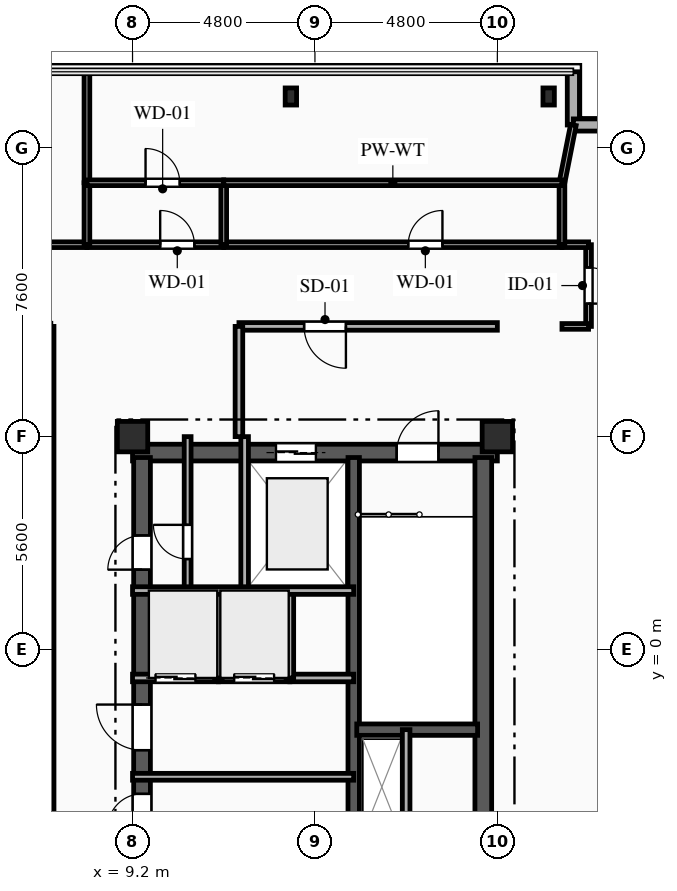
"""IFC4 building model, lengths in metres.
Left out: names, types, materials, properties, quantities, classifications, styles, units other than length and angle.
Written with IfcOpenShell. Run it as: python <this file> out.ifc"""

import sys

from ifc_helpers import new_model, si_unit, direction, frame, frame_2d, origin, origin_2d, place, context, subcontext, project, spatial, rectangle, i_section, extrude, element, fill, save


model = new_model("IFC4")
c1 = context("Model", 3, precision=1e-05, world=origin(), true_north=direction((0.0, 1.0)))
c2 = subcontext(c1, "Body", "Model", "MODEL_VIEW")
j1 = project(units=[si_unit("LENGTHUNIT", "METRE"), si_unit("PLANEANGLEUNIT", "RADIAN")], contexts=[c1])
p1 = place(None, origin())
s1 = spatial("IfcSite", under=j1, at=p1, CompositionType="ELEMENT")
p2 = place(p1, origin())
s2 = spatial("IfcBuilding", under=s1, at=p2, CompositionType="ELEMENT")
p3 = place(p2, frame((0.0, 0.0, 266.0)))
s3 = spatial("IfcBuildingStorey", under=s2, at=p3, CompositionType="ELEMENT", Elevation=266.0)
for number, where, z_axis, x_axis in (
    (1, (9.2, 5.6, 0.0), (0.0, 0.0, 1.0), (1.0, 0.0, 0.0)),
    (2, (18.8, 5.6, 0.0), (0.0, 0.0, 1.0), (1.0, 0.0, 0.0)),
):
    element("IfcColumn", number, at=place(p3, frame(where, z_axis=z_axis, x_axis=x_axis)), inside=s3, PredefinedType="COLUMN", context=c2, shape_type="SweptSolid", body=[
        extrude(rectangle(XDim=0.8, YDim=0.8, at=origin_2d()), origin(), (0.0, 0.0, 1.0), 4.2),
    ])
for number, where, z_axis, x_axis in (
    (3, (20.15, 14.55, 0.0), (0.0, 0.0, 1.0), (1.0, 0.0, 0.0)),
    (4, (13.367, 14.55, 0.0), (0.0, 0.0, 1.0), (1.0, 0.0, 0.0)),
):
    element("IfcColumn", number, at=place(p3, frame(where, z_axis=z_axis, x_axis=x_axis)), inside=s3, PredefinedType="COLUMN", context=c2, shape_type="SweptSolid", body=[
        extrude(i_section(OverallWidth=0.3, OverallDepth=0.45, WebThickness=0.014, FlangeThickness=0.026, FilletRadius=0.027, at=origin_2d()), origin(), (0.0, 0.0, 1.0), 4.2),
    ])
for number, where, z_axis, x_axis in (
    (5, (20.8, 15.2, 0.0), (0.0, 0.0, 1.0), (0.0, -1.0, 0.0)),
    (6, (20.8, 13.8, 0.0), (0.0, 0.0, 1.0), (1.0, 0.0, 0.0)),
):
    element("IfcWall", number, at=place(p3, frame(where, z_axis=z_axis, x_axis=x_axis)), inside=s3, PredefinedType="SOLIDWALL", context=c2, shape_type="SweptSolid", body=[
        extrude(rectangle(XDim=1.4, YDim=0.32, at=frame_2d((0.7, 0.0))), origin(), (0.0, 0.0, 1.0), 3.8),
    ])
p4 = place(p3, frame((9.2, 5.18, 0.0), z_axis=(0.0, 0.0, 1.0), x_axis=(1.0, 0.0, 0.0)))
e7 = element("IfcWall", 7, at=p4, inside=s3, PredefinedType="SHEAR", context=c2, shape_type="SweptSolid", body=[
    extrude(rectangle(XDim=9.6, YDim=0.44, at=frame_2d((4.8, 0.0))), origin(), (0.0, 0.0, 1.0), 3.8),
])
p5 = place(p4, frame((6.95, 0.0, 0.0)))
e8 = element("IfcOpeningElement", 8, at=p5, cuts=e7, PredefinedType="OPENING", context=c2, shape_type="SweptSolid", body=[
    extrude(rectangle(XDim=1.1, YDim=2.15, at=frame_2d((0.55, 1.075))), frame((0.0, 0.23, 0.0), z_axis=(0.0, -1.0, 0.0), x_axis=(1.0, 0.0, 0.0)), (0.0, 0.0, 1.0), 0.46),
])
p6 = place(p4, frame((3.775, 0.0, 0.0)))
e9 = element("IfcOpeningElement", 9, at=p6, cuts=e7, PredefinedType="OPENING", context=c2, shape_type="SweptSolid", body=[
    extrude(rectangle(XDim=1.05, YDim=2.1, at=frame_2d((0.525, 1.05))), frame((0.0, 0.23, 0.0), z_axis=(0.0, -1.0, 0.0), x_axis=(1.0, 0.0, 0.0)), (0.0, 0.0, 1.0), 0.46),
])
p7 = place(p3, frame((9.45, -5.05, 0.0), z_axis=(0.0, 0.0, 1.0), x_axis=(0.0, 1.0, 0.0)))
e10 = element("IfcWall", 10, at=p7, inside=s3, PredefinedType="SHEAR", context=c2, shape_type="SweptSolid", body=[
    extrude(rectangle(XDim=10.1, YDim=0.44, at=frame_2d((5.05, 0.0))), origin(), (0.0, 0.0, 1.0), 3.8),
])
p8 = place(p7, frame((7.15, 0.0, 0.0)))
e11 = element("IfcOpeningElement", 11, at=p8, cuts=e10, PredefinedType="OPENING", context=c2, shape_type="SweptSolid", body=[
    extrude(rectangle(XDim=0.9, YDim=2.1, at=frame_2d((0.45, 1.05))), frame((0.0, 0.23, 0.0), z_axis=(0.0, -1.0, 0.0), x_axis=(1.0, 0.0, 0.0)), (0.0, 0.0, 1.0), 0.46),
])
p9 = place(p7, frame((2.4, 0.0, 0.0)))
e12 = element("IfcOpeningElement", 12, at=p9, cuts=e10, PredefinedType="OPENING", context=c2, shape_type="SweptSolid", body=[
    extrude(rectangle(XDim=1.2, YDim=2.15, at=frame_2d((0.6, 1.075))), frame((0.0, 0.23, 0.0), z_axis=(0.0, -1.0, 0.0), x_axis=(1.0, 0.0, 0.0)), (0.0, 0.0, 1.0), 0.46),
])
p10 = place(p7, frame((0.35, 0.0, 0.0)))
e13 = element("IfcOpeningElement", 13, at=p10, cuts=e10, PredefinedType="OPENING", context=c2, shape_type="SweptSolid", body=[
    extrude(rectangle(XDim=0.9, YDim=2.1, at=frame_2d((0.45, 1.05))), frame((0.0, 0.23, 0.0), z_axis=(0.0, -1.0, 0.0), x_axis=(1.0, 0.0, 0.0)), (0.0, 0.0, 1.0), 0.46),
])
p11 = place(p3, frame((18.43, -5.05, 0.0), z_axis=(0.0, 0.0, 1.0), x_axis=(0.0, 1.0, 0.0)))
e14 = element("IfcWall", 14, at=p11, inside=s3, PredefinedType="SHEAR", context=c2, shape_type="SweptSolid", body=[
    extrude(rectangle(XDim=10.1, YDim=0.44, at=frame_2d((5.05, 0.0))), origin(), (0.0, 0.0, 1.0), 3.8),
])
p12 = place(p3, frame((15.02, -5.05, 0.0), z_axis=(0.0, 0.0, 1.0), x_axis=(0.0, 1.0, 0.0)))
e15 = element("IfcWall", 15, at=p12, inside=s3, PredefinedType="SHEAR", context=c2, shape_type="SweptSolid", body=[
    extrude(rectangle(XDim=10.1, YDim=0.3, at=frame_2d((5.05, 0.0))), origin(), (0.0, 0.0, 1.0), 3.8),
])
p13 = place(p3, frame((15.1, -2.11, 0.0), z_axis=(0.0, 0.0, 1.0), x_axis=(1.0, 0.0, 0.0)))
e16 = element("IfcWall", 16, at=p13, inside=s3, PredefinedType="SHEAR", context=c2, shape_type="SweptSolid", body=[
    extrude(rectangle(XDim=3.18, YDim=0.3, at=frame_2d((1.59, 0.0))), origin(), (0.0, 0.0, 1.0), 3.8),
])
p14 = place(p3, frame((16.4, -2.11, 0.0), z_axis=(0.0, 0.0, 1.0), x_axis=(0.0, -1.0, 0.0)))
e17 = element("IfcWall", 17, at=p14, inside=s3, PredefinedType="PARTITIONING", context=c2, shape_type="SweptSolid", body=[
    extrude(rectangle(XDim=3.49, YDim=0.2, at=frame_2d((1.745, 0.0))), origin(), (0.0, 0.0, 1.0), 3.8),
])
p15 = place(p3, frame((12.15, 5.6, 0.0), z_axis=(0.0, 0.0, 1.0), x_axis=(0.0, -1.0, 0.0)))
e18 = element("IfcWall", 18, at=p15, inside=s3, PredefinedType="PARTITIONING", context=c2, shape_type="SweptSolid", body=[
    extrude(rectangle(XDim=4.05, YDim=0.2, at=frame_2d((2.025, 0.0))), origin(), (0.0, 0.0, 1.0), 3.8),
])
p16 = place(p3, frame((18.8, 8.5, 0.0), z_axis=(0.0, 0.0, 1.0), x_axis=(-1.0, 0.0, 0.0)))
e19 = element("IfcWall", 19, at=p16, inside=s3, PredefinedType="PARTITIONING", context=c2, shape_type="SweptSolid", body=[
    extrude(rectangle(XDim=6.8, YDim=0.2, at=frame_2d((3.4, 0.0))), origin(), (0.0, 0.0, 1.0), 3.8),
])
p17 = place(p16, frame((3.985, 0.0, 0.0)))
e20 = element("IfcOpeningElement", 20, at=p17, cuts=e19, PredefinedType="OPENING", context=c2, shape_type="SweptSolid", body=[
    extrude(rectangle(XDim=1.1, YDim=2.15, at=frame_2d((0.55, 1.075))), frame((0.0, 0.11, 0.0), z_axis=(0.0, -1.0, 0.0), x_axis=(1.0, 0.0, 0.0)), (0.0, 0.0, 1.0), 0.22),
])
p18 = place(p3, frame((12.0, 8.5, 0.0), z_axis=(0.0, 0.0, 1.0), x_axis=(0.0, -1.0, 0.0)))
e21 = element("IfcWall", 21, at=p18, inside=s3, PredefinedType="PARTITIONING", context=c2, shape_type="SweptSolid", body=[
    extrude(rectangle(XDim=2.9, YDim=0.2, at=frame_2d((1.45, 0.0))), origin(), (0.0, 0.0, 1.0), 3.8),
])
p19 = place(p3, frame((10.65, 1.55, 0.0), z_axis=(0.0, 0.0, 1.0), x_axis=(0.0, 1.0, 0.0)))
e22 = element("IfcWall", 22, at=p19, inside=s3, PredefinedType="PARTITIONING", context=c2, shape_type="SweptSolid", body=[
    extrude(rectangle(XDim=4.05, YDim=0.18, at=frame_2d((2.025, 0.0))), origin(), (0.0, 0.0, 1.0), 3.8),
])
p20 = place(p19, frame((0.829, 0.0, 0.0)))
e23 = element("IfcOpeningElement", 23, at=p20, cuts=e22, PredefinedType="OPENING", context=c2, shape_type="SweptSolid", body=[
    extrude(rectangle(XDim=0.9, YDim=2.1, at=frame_2d((0.45, 1.05))), frame((0.0, 0.1, 0.0), z_axis=(0.0, -1.0, 0.0), x_axis=(1.0, 0.0, 0.0)), (0.0, 0.0, 1.0), 0.2),
])
p21 = place(p3, frame((9.2, -3.35, 0.0), z_axis=(0.0, 0.0, 1.0), x_axis=(1.0, 0.0, 0.0)))
e24 = element("IfcWall", 24, at=p21, inside=s3, PredefinedType="PARTITIONING", context=c2, shape_type="SweptSolid", body=[
    extrude(rectangle(XDim=5.82, YDim=0.18, at=frame_2d((2.91, 0.0))), origin(), (0.0, 0.0, 1.0), 3.8),
])
p22 = place(p3, frame((11.46, -0.75, 0.0), z_axis=(0.0, 0.0, 1.0), x_axis=(-1.0, 0.0, 0.0)))
e25 = element("IfcWall", 25, at=p22, inside=s3, PredefinedType="PARTITIONING", context=c2, shape_type="SweptSolid", body=[
    extrude(rectangle(XDim=2.26, YDim=0.2, at=frame_2d((1.13, 0.0))), origin(), (0.0, 0.0, 1.0), 3.8),
])
p23 = place(p22, frame((0.605, 0.0, 0.0)))
e26 = element("IfcOpeningElement", 26, at=p23, cuts=e25, PredefinedType="OPENING", context=c2, shape_type="SweptSolid", body=[
    extrude(rectangle(XDim=1.05, YDim=2.1, at=frame_2d((0.525, 1.05))), frame((0.0, 0.11, 0.0), z_axis=(0.0, -1.0, 0.0), x_axis=(1.0, 0.0, 0.0)), (0.0, 0.0, 1.0), 0.22),
])
p24 = place(p3, frame((13.34, -0.75, 0.0), z_axis=(0.0, 0.0, 1.0), x_axis=(-1.0, 0.0, 0.0)))
e27 = element("IfcWall", 27, at=p24, inside=s3, PredefinedType="PARTITIONING", context=c2, shape_type="SweptSolid", body=[
    extrude(rectangle(XDim=1.88, YDim=0.2, at=frame_2d((0.94, 0.0))), origin(), (0.0, 0.0, 1.0), 3.8),
])
p25 = place(p24, frame((0.415, 0.0, 0.0)))
e28 = element("IfcOpeningElement", 28, at=p25, cuts=e27, PredefinedType="OPENING", context=c2, shape_type="SweptSolid", body=[
    extrude(rectangle(XDim=1.05, YDim=2.1, at=frame_2d((0.525, 1.05))), frame((0.0, 0.11, 0.0), z_axis=(0.0, -1.0, 0.0), x_axis=(1.0, 0.0, 0.0)), (0.0, 0.0, 1.0), 0.22),
])
p26 = place(p3, frame((15.02, -0.75, 0.0), z_axis=(0.0, 0.0, 1.0), x_axis=(-1.0, 0.0, 0.0)))
e29 = element("IfcWall", 29, at=p26, inside=s3, PredefinedType="PARTITIONING", context=c2, shape_type="SweptSolid", body=[
    extrude(rectangle(XDim=1.68, YDim=0.2, at=frame_2d((0.84, 0.0))), origin(), (0.0, 0.0, 1.0), 3.8),
])
for number, where, z_axis, x_axis in (
    (30, (11.46, -0.75, 0.0), (0.0, 0.0, 1.0), (0.0, 1.0, 0.0)),
    (31, (13.34, -0.75, 0.0), (0.0, 0.0, 1.0), (0.0, 1.0, 0.0)),
):
    element("IfcWall", number, at=place(p3, frame(where, z_axis=z_axis, x_axis=x_axis)), inside=s3, PredefinedType="PARTITIONING", context=c2, shape_type="SweptSolid", body=[
        extrude(rectangle(XDim=2.3, YDim=0.2, at=frame_2d((1.15, 0.0))), origin(), (0.0, 0.0, 1.0), 3.8),
    ])
p27 = place(p3, frame((21.2, 10.65, 0.0), z_axis=(0.0, 0.0, 1.0), x_axis=(0.0, -1.0, 0.0)))
e32 = element("IfcWall", 32, at=p27, inside=s3, PredefinedType="PARTITIONING", context=c2, shape_type="SweptSolid", body=[
    extrude(rectangle(XDim=2.15, YDim=0.15, at=frame_2d((1.075, 0.0))), origin(), (0.0, 0.0, 1.0), 3.8),
])
p28 = place(p27, frame((0.6, 0.0, 0.0)))
e33 = element("IfcOpeningElement", 33, at=p28, cuts=e32, PredefinedType="OPENING", context=c2, shape_type="SweptSolid", body=[
    extrude(rectangle(XDim=0.95, YDim=2.1, at=frame_2d((0.475, 1.05))), frame((0.0, 0.085, 0.0), z_axis=(0.0, -1.0, 0.0), x_axis=(1.0, 0.0, 0.0)), (0.0, 0.0, 1.0), 0.17),
])
for number, where, z_axis, x_axis in (
    (34, (20.5, 10.65, 0.0), (0.0, 0.0, 1.0), (1.0, 0.0, 0.0)),
    (35, (21.2, 8.5, 0.0), (0.0, 0.0, 1.0), (-1.0, 0.0, 0.0)),
):
    element("IfcWall", number, at=place(p3, frame(where, z_axis=z_axis, x_axis=x_axis)), inside=s3, PredefinedType="PARTITIONING", context=c2, shape_type="SweptSolid", body=[
        extrude(rectangle(XDim=0.7, YDim=0.15, at=frame_2d((0.35, 0.0))), origin(), (0.0, 0.0, 1.0), 3.8),
    ])
p29 = place(p3, frame((0.0, 10.65, 0.0), z_axis=(0.0, 0.0, 1.0), x_axis=(1.0, 0.0, 0.0)))
e36 = element("IfcWall", 36, at=p29, inside=s3, PredefinedType="PARTITIONING", context=c2, shape_type="SweptSolid", body=[
    extrude(rectangle(XDim=8.0, YDim=0.15, at=frame_2d((4.0, 0.0))), origin(), (0.0, 0.0, 1.0), 3.8),
])
p30 = place(p3, frame((8.0, 10.65, 0.0), z_axis=(0.0, 0.0, 1.0), x_axis=(1.0, 0.0, 0.0)))
e37 = element("IfcWall", 37, at=p30, inside=s3, PredefinedType="PLUMBINGWALL", context=c2, shape_type="SweptSolid", body=[
    extrude(rectangle(XDim=3.6, YDim=0.15, at=frame_2d((1.8, 0.0))), origin(), (0.0, 0.0, 1.0), 3.8),
])
p31 = place(p30, frame((1.927, 0.0, 0.0)))
e38 = element("IfcOpeningElement", 38, at=p31, cuts=e37, PredefinedType="OPENING", context=c2, shape_type="SweptSolid", body=[
    extrude(rectangle(XDim=0.9, YDim=2.1, at=frame_2d((0.45, 1.05))), frame((0.0, 0.085, 0.0), z_axis=(0.0, -1.0, 0.0), x_axis=(1.0, 0.0, 0.0)), (0.0, 0.0, 1.0), 0.17),
])
p32 = place(p3, frame((11.6, 10.65, 0.0), z_axis=(0.0, 0.0, 1.0), x_axis=(1.0, 0.0, 0.0)))
e39 = element("IfcWall", 39, at=p32, inside=s3, PredefinedType="PLUMBINGWALL", context=c2, shape_type="SweptSolid", body=[
    extrude(rectangle(XDim=8.9, YDim=0.15, at=frame_2d((4.45, 0.0))), origin(), (0.0, 0.0, 1.0), 3.8),
])
p33 = place(p32, frame((4.855, 0.0, 0.0)))
e40 = element("IfcOpeningElement", 40, at=p33, cuts=e39, PredefinedType="OPENING", context=c2, shape_type="SweptSolid", body=[
    extrude(rectangle(XDim=0.9, YDim=2.1, at=frame_2d((0.45, 1.05))), frame((0.0, 0.085, 0.0), z_axis=(0.0, -1.0, 0.0), x_axis=(1.0, 0.0, 0.0)), (0.0, 0.0, 1.0), 0.17),
])
p34 = place(p3, frame((7.05, -5.6, 0.0), z_axis=(0.0, 0.0, 1.0), x_axis=(0.0, 1.0, 0.0)))
e41 = element("IfcWall", 41, at=p34, inside=s3, PredefinedType="PARTITIONING", context=c2, shape_type="SweptSolid", body=[
    extrude(rectangle(XDim=14.1, YDim=0.165, at=frame_2d((7.05, 0.0))), origin(), (0.0, 0.0, 1.0), 3.8),
])
p35 = place(p3, frame((20.5, 10.65, 0.0), z_axis=(0.0, 0.0, 1.0), x_axis=(0.0, 1.0, 0.0)))
e42 = element("IfcWall", 42, at=p35, inside=s3, PredefinedType="PLUMBINGWALL", context=c2, shape_type="SweptSolid", body=[
    extrude(rectangle(XDim=1.63, YDim=0.15, at=frame_2d((0.815, 0.0))), origin(), (0.0, 0.0, 1.0), 3.8),
])
p36 = place(p3, frame((20.5, 12.28, 0.0), z_axis=(0.0, 0.0, 1.0), x_axis=(0.193660970649, 0.981068513636, 0.0)))
e43 = element("IfcWall", 43, at=p36, inside=s3, PredefinedType="PARTITIONING", context=c2, shape_type="SweptSolid", body=[
    extrude(rectangle(XDim=1.549, YDim=0.15, at=frame_2d((0.775, 0.0))), origin(), (0.0, 0.0, 1.0), 3.8),
])
p37 = place(p3, frame((8.0, 12.28, 0.0), z_axis=(0.0, 0.0, 1.0), x_axis=(0.0, -1.0, 0.0)))
e44 = element("IfcWall", 44, at=p37, inside=s3, PredefinedType="PLUMBINGWALL", context=c2, shape_type="SweptSolid", body=[
    extrude(rectangle(XDim=1.63, YDim=0.15, at=frame_2d((0.815, 0.0))), origin(), (0.0, 0.0, 1.0), 3.8),
])
p38 = place(p3, frame((8.0, 15.2, 0.0), z_axis=(0.0, 0.0, 1.0), x_axis=(0.0, -1.0, 0.0)))
e45 = element("IfcWall", 45, at=p38, inside=s3, PredefinedType="PARTITIONING", context=c2, shape_type="SweptSolid", body=[
    extrude(rectangle(XDim=2.92, YDim=0.15, at=frame_2d((1.46, 0.0))), origin(), (0.0, 0.0, 1.0), 3.8),
])
p39 = place(p3, frame((11.6, 12.28, 0.0), z_axis=(0.0, 0.0, 1.0), x_axis=(0.0, -1.0, 0.0)))
e46 = element("IfcWall", 46, at=p39, inside=s3, PredefinedType="PLUMBINGWALL", context=c2, shape_type="SweptSolid", body=[
    extrude(rectangle(XDim=1.63, YDim=0.15, at=frame_2d((0.815, 0.0))), origin(), (0.0, 0.0, 1.0), 3.8),
])
p40 = place(p3, frame((8.0, 12.28, 0.0), z_axis=(0.0, 0.0, 1.0), x_axis=(1.0, 0.0, 0.0)))
e47 = element("IfcWall", 47, at=p40, inside=s3, PredefinedType="PLUMBINGWALL", context=c2, shape_type="SweptSolid", body=[
    extrude(rectangle(XDim=3.6, YDim=0.15, at=frame_2d((1.8, 0.0))), origin(), (0.0, 0.0, 1.0), 3.8),
])
p41 = place(p40, frame((1.542, 0.0, 0.0)))
e48 = element("IfcOpeningElement", 48, at=p41, cuts=e47, PredefinedType="OPENING", context=c2, shape_type="SweptSolid", body=[
    extrude(rectangle(XDim=0.9, YDim=2.1, at=frame_2d((0.45, 1.05))), frame((0.0, 0.085, 0.0), z_axis=(0.0, -1.0, 0.0), x_axis=(1.0, 0.0, 0.0)), (0.0, 0.0, 1.0), 0.17),
])
p42 = place(p3, frame((11.6, 12.28, 0.0), z_axis=(0.0, 0.0, 1.0), x_axis=(1.0, 0.0, 0.0)))
e49 = element("IfcWall", 49, at=p42, inside=s3, PredefinedType="PLUMBINGWALL", context=c2, shape_type="SweptSolid", body=[
    extrude(rectangle(XDim=8.9, YDim=0.15, at=frame_2d((4.45, 0.0))), origin(), (0.0, 0.0, 1.0), 3.8),
])
p43 = place(p3, frame((9.2, 1.55, 0.0), z_axis=(0.0, 0.0, 1.0), x_axis=(1.0, 0.0, 0.0)))
e50 = element("IfcWall", 50, at=p43, inside=s3, PredefinedType="PARTITIONING", context=c2, shape_type="SweptSolid", body=[
    extrude(rectangle(XDim=5.82, YDim=0.2, at=frame_2d((2.91, 0.0))), origin(), (0.0, 0.0, 1.0), 3.8),
])
p44 = place(p5, origin())
e51 = element("IfcDoor", 51, at=p44, inside=s3, OperationType="SINGLE_SWING_RIGHT", PredefinedType="DOOR", context=c2, shape_type="SweptSolid", body=[
    extrude(rectangle(XDim=1.1, YDim=2.15, at=frame_2d((0.55, 1.075))), frame((0.0, 0.025, 0.0), z_axis=(0.0, -1.0, 0.0), x_axis=(1.0, 0.0, 0.0)), (0.0, 0.0, 1.0), 0.05),
])
fill(e8, e51)
p45 = place(p6, origin())
e52 = element("IfcDoor", 52, at=p45, inside=s3, OperationType="DOUBLE_DOOR_SLIDING", PredefinedType="DOOR", context=c2, shape_type="SweptSolid", body=[
    extrude(rectangle(XDim=1.05, YDim=2.1, at=frame_2d((0.525, 1.05))), frame((0.0, 0.025, 0.0), z_axis=(0.0, -1.0, 0.0), x_axis=(1.0, 0.0, 0.0)), (0.0, 0.0, 1.0), 0.05),
])
fill(e9, e52)
p46 = place(p17, origin())
e53 = element("IfcDoor", 53, at=p46, inside=s3, OperationType="SINGLE_SWING_LEFT", PredefinedType="DOOR", context=c2, shape_type="SweptSolid", body=[
    extrude(rectangle(XDim=1.1, YDim=2.15, at=frame_2d((0.55, 1.075))), frame((0.0, 0.025, 0.0), z_axis=(0.0, -1.0, 0.0), x_axis=(1.0, 0.0, 0.0)), (0.0, 0.0, 1.0), 0.05),
])
fill(e20, e53)
p47 = place(p20, origin())
e54 = element("IfcDoor", 54, at=p47, inside=s3, OperationType="SINGLE_SWING_RIGHT", PredefinedType="DOOR", context=c2, shape_type="SweptSolid", body=[
    extrude(rectangle(XDim=0.9, YDim=2.1, at=frame_2d((0.45, 1.05))), frame((0.0, 0.025, 0.0), z_axis=(0.0, -1.0, 0.0), x_axis=(1.0, 0.0, 0.0)), (0.0, 0.0, 1.0), 0.05),
])
fill(e23, e54)
p48 = place(p8, origin())
e55 = element("IfcDoor", 55, at=p48, inside=s3, OperationType="SINGLE_SWING_LEFT", PredefinedType="DOOR", context=c2, shape_type="SweptSolid", body=[
    extrude(rectangle(XDim=0.9, YDim=2.1, at=frame_2d((0.45, 1.05))), frame((0.0, 0.025, 0.0), z_axis=(0.0, -1.0, 0.0), x_axis=(1.0, 0.0, 0.0)), (0.0, 0.0, 1.0), 0.05),
])
fill(e11, e55)
p49 = place(p23, origin())
e56 = element("IfcDoor", 56, at=p49, inside=s3, OperationType="DOUBLE_DOOR_SLIDING", PredefinedType="DOOR", context=c2, shape_type="SweptSolid", body=[
    extrude(rectangle(XDim=1.05, YDim=2.1, at=frame_2d((0.525, 1.05))), frame((0.0, 0.025, 0.0), z_axis=(0.0, -1.0, 0.0), x_axis=(1.0, 0.0, 0.0)), (0.0, 0.0, 1.0), 0.05),
])
fill(e26, e56)
p50 = place(p25, origin())
e57 = element("IfcDoor", 57, at=p50, inside=s3, OperationType="DOUBLE_DOOR_SLIDING", PredefinedType="DOOR", context=c2, shape_type="SweptSolid", body=[
    extrude(rectangle(XDim=1.05, YDim=2.1, at=frame_2d((0.525, 1.05))), frame((0.0, 0.025, 0.0), z_axis=(0.0, -1.0, 0.0), x_axis=(1.0, 0.0, 0.0)), (0.0, 0.0, 1.0), 0.05),
])
fill(e28, e57)
p51 = place(p9, origin())
e58 = element("IfcDoor", 58, at=p51, inside=s3, OperationType="SINGLE_SWING_RIGHT", PredefinedType="DOOR", context=c2, shape_type="SweptSolid", body=[
    extrude(rectangle(XDim=1.2, YDim=2.15, at=frame_2d((0.6, 1.075))), frame((0.0, 0.025, 0.0), z_axis=(0.0, -1.0, 0.0), x_axis=(1.0, 0.0, 0.0)), (0.0, 0.0, 1.0), 0.05),
])
fill(e12, e58)
p52 = place(p10, origin())
e59 = element("IfcDoor", 59, at=p52, inside=s3, OperationType="SINGLE_SWING_LEFT", PredefinedType="DOOR", context=c2, shape_type="SweptSolid", body=[
    extrude(rectangle(XDim=0.9, YDim=2.1, at=frame_2d((0.45, 1.05))), frame((0.0, 0.025, 0.0), z_axis=(0.0, -1.0, 0.0), x_axis=(1.0, 0.0, 0.0)), (0.0, 0.0, 1.0), 0.05),
])
fill(e13, e59)
p53 = place(p28, origin())
e60 = element("IfcDoor", 60, at=p53, inside=s3, OperationType="SINGLE_SWING_RIGHT", PredefinedType="DOOR", context=c2, shape_type="SweptSolid", body=[
    extrude(rectangle(XDim=0.95, YDim=2.1, at=frame_2d((0.475, 1.05))), frame((0.0, 0.025, 0.0), z_axis=(0.0, -1.0, 0.0), x_axis=(1.0, 0.0, 0.0)), (0.0, 0.0, 1.0), 0.05),
])
fill(e33, e60)
p54 = place(p31, origin())
e61 = element("IfcDoor", 61, at=p54, inside=s3, OperationType="SINGLE_SWING_LEFT", PredefinedType="DOOR", context=c2, shape_type="SweptSolid", body=[
    extrude(rectangle(XDim=0.9, YDim=2.1, at=frame_2d((0.45, 1.05))), frame((0.0, 0.025, 0.0), z_axis=(0.0, -1.0, 0.0), x_axis=(1.0, 0.0, 0.0)), (0.0, 0.0, 1.0), 0.05),
])
fill(e38, e61)
p55 = place(p33, origin())
e62 = element("IfcDoor", 62, at=p55, inside=s3, OperationType="SINGLE_SWING_RIGHT", PredefinedType="DOOR", context=c2, shape_type="SweptSolid", body=[
    extrude(rectangle(XDim=0.9, YDim=2.1, at=frame_2d((0.45, 1.05))), frame((0.0, 0.025, 0.0), z_axis=(0.0, -1.0, 0.0), x_axis=(1.0, 0.0, 0.0)), (0.0, 0.0, 1.0), 0.05),
])
fill(e40, e62)
p56 = place(p41, origin())
e63 = element("IfcDoor", 63, at=p56, inside=s3, OperationType="SINGLE_SWING_LEFT", PredefinedType="DOOR", context=c2, shape_type="SweptSolid", body=[
    extrude(rectangle(XDim=0.9, YDim=2.1, at=frame_2d((0.45, 1.05))), frame((0.0, 0.025, 0.0), z_axis=(0.0, -1.0, 0.0), x_axis=(1.0, 0.0, 0.0)), (0.0, 0.0, 1.0), 0.05),
])
fill(e48, e63)
save(model, sys.argv[1])
